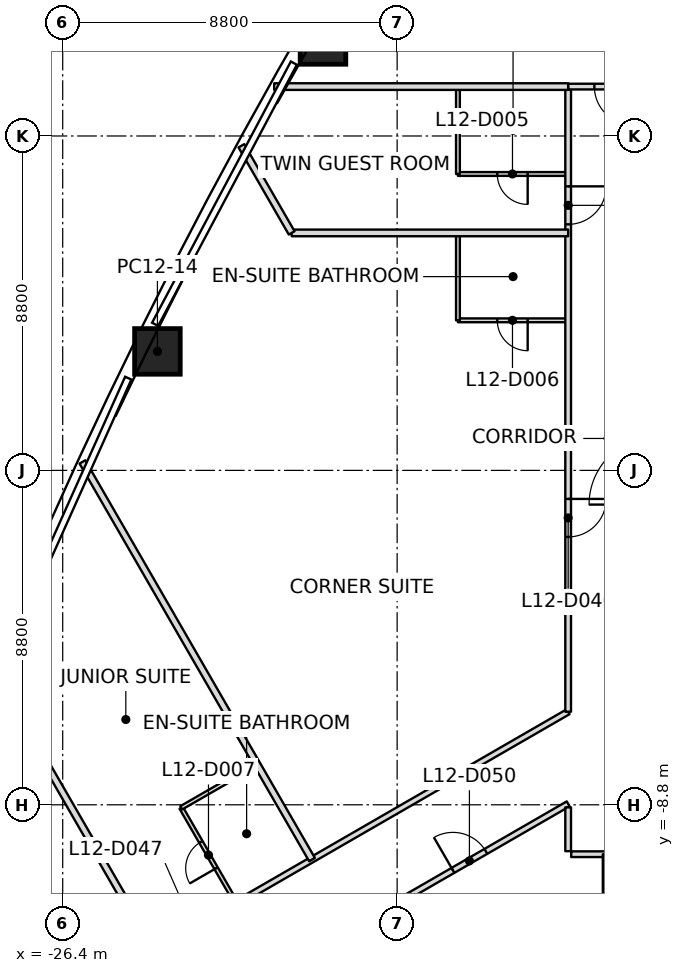
"""IFC4 building model, lengths in metres.
Left out: names, types, materials, properties, quantities, classifications, styles, units other than length and angle.
Written with IfcOpenShell. Run it as: python <this file> out.ifc"""

import sys

from ifc_helpers import new_model, si_unit, direction, frame, frame_2d, origin, origin_2d, place, context, subcontext, project, spatial, rectangle, extrude, element, fill, save


model = new_model("IFC4")
c1 = context("Model", 3, precision=1e-05, world=origin(), true_north=direction((0.0, 1.0)))
c2 = subcontext(c1, "Body", "Model", "MODEL_VIEW")
j1 = project(units=[si_unit("LENGTHUNIT", "METRE"), si_unit("PLANEANGLEUNIT", "RADIAN")], contexts=[c1])
p1 = place(None, origin())
s1 = spatial("IfcSite", under=j1, at=p1, CompositionType="ELEMENT")
p2 = place(p1, origin())
s2 = spatial("IfcBuilding", under=s1, at=p2, CompositionType="ELEMENT")
p3 = place(p2, frame((0.0, 0.0, 66.5)))
s3 = spatial("IfcBuildingStorey", under=s2, at=p3, CompositionType="ELEMENT", Elevation=66.5)
p4 = place(p3, frame((-19.551, 11.288, 0.0), z_axis=(0.010622752832, -0.006202104138, 0.999924342651), x_axis=(0.499971788485, 0.866041689005, 6.0208566e-05)))
e1 = element("IfcColumn", 1, at=p4, inside=s3, PredefinedType="COLUMN", context=c2, shape_type="SweptSolid", body=[
    extrude(rectangle(XDim=1.2, YDim=1.2, at=origin_2d()), origin(), (0.0, 0.0, 1.0), 3.7),
])
p5 = place(p3, frame((-23.908, 3.131, 0.0), z_axis=(0.015240683228, 0.002309194428, 0.99988118754), x_axis=(0.441667514031, 0.897135606394, -0.008804021245)))
e2 = element("IfcColumn", 2, at=p5, inside=s3, PredefinedType="COLUMN", context=c2, shape_type="SweptSolid", body=[
    extrude(rectangle(XDim=1.2, YDim=1.2, at=origin_2d()), origin(), (0.0, 0.0, 1.0), 3.7),
])
p6 = place(p3, frame((-23.997, -12.642, 0.0), z_axis=(0.0, 0.0, 1.0), x_axis=(-0.49999045727, 0.866030913212, 0.0)))
e3 = element("IfcWall", 3, at=p6, inside=s3, PredefinedType="PARTITIONING", context=c2, shape_type="SweptSolid", body=[
    extrude(rectangle(XDim=8.543, YDim=0.175, at=frame_2d((4.271, 0.0))), origin(), (0.0, 0.0, 1.0), 2.934),
])
p7 = place(p3, frame((-19.84, -10.242, 0.0), z_axis=(0.0, 0.0, 1.0), x_axis=(-0.499991787927, 0.866030144975, 0.0)))
e4 = element("IfcWall", 4, at=p7, inside=s3, PredefinedType="PARTITIONING", context=c2, shape_type="SweptSolid", body=[
    extrude(rectangle(XDim=12.084, YDim=0.175, at=frame_2d((6.042, 0.0))), origin(), (0.0, 0.0, 1.0), 2.934),
])
p8 = place(p3, frame((-13.1, 6.249, 0.0), z_axis=(0.0, 0.0, 1.0), x_axis=(-1.0, 0.0, 0.0)))
e5 = element("IfcWall", 5, at=p8, inside=s3, PredefinedType="PARTITIONING", context=c2, shape_type="SweptSolid", body=[
    extrude(rectangle(XDim=7.274, YDim=0.175, at=frame_2d((3.637, 0.0))), origin(), (0.0, 0.0, 1.0), 3.093),
])
p9 = place(p3, frame((-20.375, 6.249, 0.0), z_axis=(0.0, 0.0, 1.0), x_axis=(-0.499977931934, 0.866038144413, 0.0)))
e6 = element("IfcWall", 6, at=p9, inside=s3, PredefinedType="PARTITIONING", context=c2, shape_type="SweptSolid", body=[
    extrude(rectangle(XDim=2.647, YDim=0.175, at=frame_2d((1.323, 0.0))), origin(), (0.0, 0.0, 1.0), 2.934),
])
p10 = place(p3, frame((-13.1, 10.1, 0.0), z_axis=(0.0, 0.0, 1.0), x_axis=(-1.0, 0.0, 0.0)))
e7 = element("IfcWall", 7, at=p10, inside=s3, PredefinedType="PARTITIONING", context=c2, shape_type="SweptSolid", body=[
    extrude(rectangle(XDim=7.735, YDim=0.175, at=frame_2d((3.867, 0.0))), origin(), (0.0, 0.0, 1.0), 2.934),
])
p11 = place(p3, frame((-12.1, -10.1, 0.0), z_axis=(0.0, 0.0, 1.0), x_axis=(0.0, -1.0, 0.0)))
e8 = element("IfcWall", 8, at=p11, inside=s3, PredefinedType="PARTITIONING", context=c2, shape_type="SweptSolid", body=[
    extrude(rectangle(XDim=7.608, YDim=0.175, at=frame_2d((3.804, 0.0))), origin(), (0.0, 0.0, 1.0), 3.15),
])
p12 = place(p3, frame((-13.1, -6.351, 0.0), z_axis=(0.0, 0.0, 1.0), x_axis=(-0.86601949893, -0.500010227369, 0.0)))
e9 = element("IfcWall", 9, at=p12, inside=s3, PredefinedType="PARTITIONING", context=c2, shape_type="SweptSolid", body=[
    extrude(rectangle(XDim=12.582, YDim=0.15, at=frame_2d((6.291, 0.0))), origin(), (0.0, 0.0, 1.0), 2.947),
])
p13 = place(p12, frame((10.882, 0.0, 0.0)))
e10 = element("IfcOpeningElement", 10, at=p13, cuts=e9, PredefinedType="OPENING", context=c2, shape_type="SweptSolid", body=[
    extrude(rectangle(XDim=1.0, YDim=2.1, at=frame_2d((0.5, 1.05))), frame((0.0, 0.075, 0.0), z_axis=(0.0, -1.0, 0.0), x_axis=(1.0, 0.0, 0.0)), (0.0, 0.0, 1.0), 0.15),
])
p14 = place(p3, frame((-22.877, -14.421, 0.0), z_axis=(0.0, 0.0, 1.0), x_axis=(0.86601740905, 0.500013847031, 0.0)))
e11 = element("IfcWall", 11, at=p14, inside=s3, PredefinedType="PARTITIONING", context=c2, shape_type="SweptSolid", body=[
    extrude(rectangle(XDim=11.29, YDim=0.15, at=frame_2d((5.645, 0.0))), origin(), (0.0, 0.0, 1.0), 2.797),
])
p15 = place(p14, frame((0.895, 0.0, 0.0)))
e12 = element("IfcOpeningElement", 12, at=p15, cuts=e11, PredefinedType="OPENING", context=c2, shape_type="SweptSolid", body=[
    extrude(rectangle(XDim=1.0, YDim=2.1, at=frame_2d((0.5, 1.05))), frame((0.0, 0.075, 0.0), z_axis=(0.0, -1.0, 0.0), x_axis=(1.0, 0.0, 0.0)), (0.0, 0.0, 1.0), 0.15),
])
p16 = place(p14, frame((7.79, 0.0, 0.0)))
e13 = element("IfcOpeningElement", 13, at=p16, cuts=e11, PredefinedType="OPENING", context=c2, shape_type="SweptSolid", body=[
    extrude(rectangle(XDim=1.0, YDim=2.1, at=frame_2d((0.5, 1.05))), frame((0.0, 0.075, 0.0), z_axis=(0.0, -1.0, 0.0), x_axis=(1.0, 0.0, 0.0)), (0.0, 0.0, 1.0), 0.15),
])
p17 = place(p3, frame((-13.1, -8.867, 0.0), z_axis=(0.0, 0.0, 1.0), x_axis=(0.0, -1.0, 0.0)))
e14 = element("IfcWall", 14, at=p17, inside=s3, PredefinedType="PARTITIONING", context=c2, shape_type="SweptSolid", body=[
    extrude(rectangle(XDim=1.153, YDim=0.15, at=frame_2d((0.576, 0.0))), origin(), (0.0, 0.0, 1.0), 2.797),
])
p18 = place(p3, frame((-13.1, 10.02, 0.0), z_axis=(0.0, 0.0, 1.0), x_axis=(0.0, -1.0, 0.0)))
e15 = element("IfcWall", 15, at=p18, inside=s3, PredefinedType="PARTITIONING", context=c2, shape_type="SweptSolid", body=[
    extrude(rectangle(XDim=16.371, YDim=0.15, at=frame_2d((8.186, 0.0))), origin(), (0.0, 0.0, 1.0), 3.017),
])
p19 = place(p18, frame((2.545, 0.0, 0.0)))
e16 = element("IfcOpeningElement", 16, at=p19, cuts=e15, PredefinedType="OPENING", context=c2, shape_type="SweptSolid", body=[
    extrude(rectangle(XDim=1.0, YDim=2.1, at=frame_2d((0.5, 1.05))), frame((0.0, 0.075, 0.0), z_axis=(0.0, -1.0, 0.0), x_axis=(1.0, 0.0, 0.0)), (0.0, 0.0, 1.0), 0.15),
])
p20 = place(p18, frame((10.771, 0.0, 0.0)))
e17 = element("IfcOpeningElement", 17, at=p20, cuts=e15, PredefinedType="OPENING", context=c2, shape_type="SweptSolid", body=[
    extrude(rectangle(XDim=1.0, YDim=2.1, at=frame_2d((0.5, 1.05))), frame((0.0, 0.075, 0.0), z_axis=(0.0, -1.0, 0.0), x_axis=(1.0, 0.0, 0.0)), (0.0, 0.0, 1.0), 0.15),
])
p21 = place(p3, frame((-4.18, 10.1, 0.0), z_axis=(0.0, 0.0, 1.0), x_axis=(-1.0, 0.0, 0.0)))
e18 = element("IfcWall", 18, at=p21, inside=s3, PredefinedType="PARTITIONING", context=c2, shape_type="SweptSolid", body=[
    extrude(rectangle(XDim=8.92, YDim=0.15, at=frame_2d((4.46, 0.0))), origin(), (0.0, 0.0, 1.0), 2.947),
])
p22 = place(p21, frame((7.23, 0.0, 0.0)))
e19 = element("IfcOpeningElement", 19, at=p22, cuts=e18, PredefinedType="OPENING", context=c2, shape_type="SweptSolid", body=[
    extrude(rectangle(XDim=1.0, YDim=2.1, at=frame_2d((0.5, 1.05))), frame((0.0, 0.075, 0.0), z_axis=(0.0, -1.0, 0.0), x_axis=(1.0, 0.0, 0.0)), (0.0, 0.0, 1.0), 0.15),
])
p23 = place(p3, frame((-13.02, -10.1, 0.0), z_axis=(0.0, 0.0, 1.0), x_axis=(1.0, 0.0, 0.0)))
e20 = element("IfcWall", 20, at=p23, inside=s3, PredefinedType="PARTITIONING", context=c2, shape_type="SweptSolid", body=[
    extrude(rectangle(XDim=26.04, YDim=0.15, at=frame_2d((13.02, 0.0))), origin(), (0.0, 0.0, 1.0), 2.947),
])
p24 = place(p23, frame((4.02, 0.0, 0.0)))
e21 = element("IfcOpeningElement", 21, at=p24, cuts=e20, PredefinedType="OPENING", context=c2, shape_type="SweptSolid", body=[
    extrude(rectangle(XDim=1.0, YDim=2.1, at=frame_2d((0.5, 1.05))), frame((0.0, 0.075, 0.0), z_axis=(0.0, -1.0, 0.0), x_axis=(1.0, 0.0, 0.0)), (0.0, 0.0, 1.0), 0.15),
])
p25 = place(p23, frame((7.02, 0.0, 0.0)))
e22 = element("IfcOpeningElement", 22, at=p25, cuts=e20, PredefinedType="OPENING", context=c2, shape_type="SweptSolid", body=[
    extrude(rectangle(XDim=1.0, YDim=2.1, at=frame_2d((0.5, 1.05))), frame((0.0, 0.075, 0.0), z_axis=(0.0, -1.0, 0.0), x_axis=(1.0, 0.0, 0.0)), (0.0, 0.0, 1.0), 0.15),
])
p26 = place(p23, frame((12.12, 0.0, 0.0)))
e23 = element("IfcOpeningElement", 23, at=p26, cuts=e20, PredefinedType="OPENING", context=c2, shape_type="SweptSolid", body=[
    extrude(rectangle(XDim=1.0, YDim=2.1, at=frame_2d((0.5, 1.05))), frame((0.0, 0.075, 0.0), z_axis=(0.0, -1.0, 0.0), x_axis=(1.0, 0.0, 0.0)), (0.0, 0.0, 1.0), 0.15),
])
p27 = place(p23, frame((16.62, 0.0, 0.0)))
e24 = element("IfcOpeningElement", 24, at=p27, cuts=e20, PredefinedType="OPENING", context=c2, shape_type="SweptSolid", body=[
    extrude(rectangle(XDim=1.0, YDim=2.1, at=frame_2d((0.5, 1.05))), frame((0.0, 0.075, 0.0), z_axis=(0.0, -1.0, 0.0), x_axis=(1.0, 0.0, 0.0)), (0.0, 0.0, 1.0), 0.15),
])
p28 = place(p23, frame((19.62, 0.0, 0.0)))
e25 = element("IfcOpeningElement", 25, at=p28, cuts=e20, PredefinedType="OPENING", context=c2, shape_type="SweptSolid", body=[
    extrude(rectangle(XDim=1.0, YDim=2.1, at=frame_2d((0.5, 1.05))), frame((0.0, 0.075, 0.0), z_axis=(0.0, -1.0, 0.0), x_axis=(1.0, 0.0, 0.0)), (0.0, 0.0, 1.0), 0.15),
])
p29 = place(p3, frame((-21.846, -11.366, 0.0), z_axis=(0.0, 0.0, 1.0), x_axis=(-0.500036638401, 0.866004249561, 0.0)))
e26 = element("IfcWall", 26, at=p29, inside=s3, PredefinedType="PARTITIONING", context=c2, shape_type="SweptSolid", body=[
    extrude(rectangle(XDim=2.87, YDim=0.1, at=frame_2d((1.435, 0.0))), origin(), (0.0, 0.0, 1.0), 3.15),
])
p30 = place(p29, frame((1.035, 0.0, 0.0)))
e27 = element("IfcOpeningElement", 27, at=p30, cuts=e26, PredefinedType="OPENING", context=c2, shape_type="SweptSolid", body=[
    extrude(rectangle(XDim=0.8, YDim=2.1, at=frame_2d((0.4, 1.05))), frame((0.0, 0.05, 0.0), z_axis=(0.0, -1.0, 0.0), x_axis=(1.0, 0.0, 0.0)), (0.0, 0.0, 1.0), 0.1),
])
p31 = place(p3, frame((-23.281, -8.881, 0.0), z_axis=(0.0, 0.0, 1.0), x_axis=(0.866017224141, 0.500014167291, 0.0)))
e28 = element("IfcWall", 28, at=p31, inside=s3, PredefinedType="PARTITIONING", context=c2, shape_type="SweptSolid", body=[
    extrude(rectangle(XDim=2.27, YDim=0.1, at=frame_2d((1.135, 0.0))), origin(), (0.0, 0.0, 1.0), 3.15),
])
p32 = place(p3, frame((-13.13, 3.949, 0.0), z_axis=(0.0, 0.0, 1.0), x_axis=(-1.0, 0.0, 0.0)))
e29 = element("IfcWall", 29, at=p32, inside=s3, PredefinedType="PARTITIONING", context=c2, shape_type="SweptSolid", body=[
    extrude(rectangle(XDim=2.87, YDim=0.1, at=frame_2d((1.435, 0.0))), origin(), (0.0, 0.0, 1.0), 3.093),
])
p33 = place(p32, frame((1.035, 0.0, 0.0)))
e30 = element("IfcOpeningElement", 30, at=p33, cuts=e29, PredefinedType="OPENING", context=c2, shape_type="SweptSolid", body=[
    extrude(rectangle(XDim=0.8, YDim=2.1, at=frame_2d((0.4, 1.05))), frame((0.0, 0.05, 0.0), z_axis=(0.0, -1.0, 0.0), x_axis=(1.0, 0.0, 0.0)), (0.0, 0.0, 1.0), 0.1),
])
p34 = place(p3, frame((-16.0, 3.949, 0.0), z_axis=(0.0, 0.0, 1.0), x_axis=(0.0, 1.0, 0.0)))
e31 = element("IfcWall", 31, at=p34, inside=s3, PredefinedType="PARTITIONING", context=c2, shape_type="SweptSolid", body=[
    extrude(rectangle(XDim=2.27, YDim=0.1, at=frame_2d((1.135, 0.0))), origin(), (0.0, 0.0, 1.0), 3.093),
])
p35 = place(p3, frame((-13.13, 7.8, 0.0), z_axis=(0.0, 0.0, 1.0), x_axis=(-1.0, 0.0, 0.0)))
e32 = element("IfcWall", 32, at=p35, inside=s3, PredefinedType="PARTITIONING", context=c2, shape_type="SweptSolid", body=[
    extrude(rectangle(XDim=2.87, YDim=0.1, at=frame_2d((1.435, 0.0))), origin(), (0.0, 0.0, 1.0), 3.15),
])
p36 = place(p35, frame((1.035, 0.0, 0.0)))
e33 = element("IfcOpeningElement", 33, at=p36, cuts=e32, PredefinedType="OPENING", context=c2, shape_type="SweptSolid", body=[
    extrude(rectangle(XDim=0.8, YDim=2.1, at=frame_2d((0.4, 1.05))), frame((0.0, 0.05, 0.0), z_axis=(0.0, -1.0, 0.0), x_axis=(1.0, 0.0, 0.0)), (0.0, 0.0, 1.0), 0.1),
])
p37 = place(p3, frame((-16.0, 7.8, 0.0), z_axis=(0.0, 0.0, 1.0), x_axis=(0.0, 1.0, 0.0)))
e34 = element("IfcWall", 34, at=p37, inside=s3, PredefinedType="PARTITIONING", context=c2, shape_type="SweptSolid", body=[
    extrude(rectangle(XDim=2.27, YDim=0.1, at=frame_2d((1.135, 0.0))), origin(), (0.0, 0.0, 1.0), 3.15),
])
p38 = place(p22, origin())
e35 = element("IfcDoor", 35, at=p38, inside=s3, OperationType="SINGLE_SWING_RIGHT", PredefinedType="DOOR", context=c2, shape_type="SweptSolid", body=[
    extrude(rectangle(XDim=1.0, YDim=2.1, at=frame_2d((0.5, 1.05))), frame((0.0, 0.025, 0.0), z_axis=(0.0, -1.0, 0.0), x_axis=(1.0, 0.0, 0.0)), (0.0, 0.0, 1.0), 0.05),
])
fill(e19, e35)
p39 = place(p19, origin())
e36 = element("IfcDoor", 36, at=p39, inside=s3, OperationType="SINGLE_SWING_LEFT", PredefinedType="DOOR", context=c2, shape_type="SweptSolid", body=[
    extrude(rectangle(XDim=1.0, YDim=2.1, at=frame_2d((0.5, 1.05))), frame((0.0, 0.025, 0.0), z_axis=(0.0, -1.0, 0.0), x_axis=(1.0, 0.0, 0.0)), (0.0, 0.0, 1.0), 0.05),
])
fill(e16, e36)
p40 = place(p36, origin())
e37 = element("IfcDoor", 37, at=p40, inside=s3, OperationType="SINGLE_SWING_RIGHT", PredefinedType="DOOR", context=c2, shape_type="SweptSolid", body=[
    extrude(rectangle(XDim=0.8, YDim=2.1, at=frame_2d((0.4, 1.05))), frame((0.0, 0.025, 0.0), z_axis=(0.0, -1.0, 0.0), x_axis=(1.0, 0.0, 0.0)), (0.0, 0.0, 1.0), 0.05),
])
fill(e33, e37)
p41 = place(p20, origin())
e38 = element("IfcDoor", 38, at=p41, inside=s3, OperationType="SINGLE_SWING_LEFT", PredefinedType="DOOR", context=c2, shape_type="SweptSolid", body=[
    extrude(rectangle(XDim=1.0, YDim=2.1, at=frame_2d((0.5, 1.05))), frame((0.0, 0.025, 0.0), z_axis=(0.0, -1.0, 0.0), x_axis=(1.0, 0.0, 0.0)), (0.0, 0.0, 1.0), 0.05),
])
fill(e17, e38)
p42 = place(p33, origin())
e39 = element("IfcDoor", 39, at=p42, inside=s3, OperationType="SINGLE_SWING_LEFT", PredefinedType="DOOR", context=c2, shape_type="SweptSolid", body=[
    extrude(rectangle(XDim=0.8, YDim=2.1, at=frame_2d((0.4, 1.05))), frame((0.0, 0.025, 0.0), z_axis=(0.0, -1.0, 0.0), x_axis=(1.0, 0.0, 0.0)), (0.0, 0.0, 1.0), 0.05),
])
fill(e30, e39)
p43 = place(p30, origin())
e40 = element("IfcDoor", 40, at=p43, inside=s3, OperationType="SINGLE_SWING_RIGHT", PredefinedType="DOOR", context=c2, shape_type="SweptSolid", body=[
    extrude(rectangle(XDim=0.8, YDim=2.1, at=frame_2d((0.4, 1.05))), frame((0.0, 0.025, 0.0), z_axis=(0.0, -1.0, 0.0), x_axis=(1.0, 0.0, 0.0)), (0.0, 0.0, 1.0), 0.05),
])
fill(e27, e40)
p44 = place(p16, origin())
e41 = element("IfcDoor", 41, at=p44, inside=s3, OperationType="SINGLE_SWING_LEFT", PredefinedType="DOOR", context=c2, shape_type="SweptSolid", body=[
    extrude(rectangle(XDim=1.0, YDim=2.1, at=frame_2d((0.5, 1.05))), frame((0.0, 0.025, 0.0), z_axis=(0.0, -1.0, 0.0), x_axis=(1.0, 0.0, 0.0)), (0.0, 0.0, 1.0), 0.05),
])
fill(e13, e41)
save(model, sys.argv[1])
